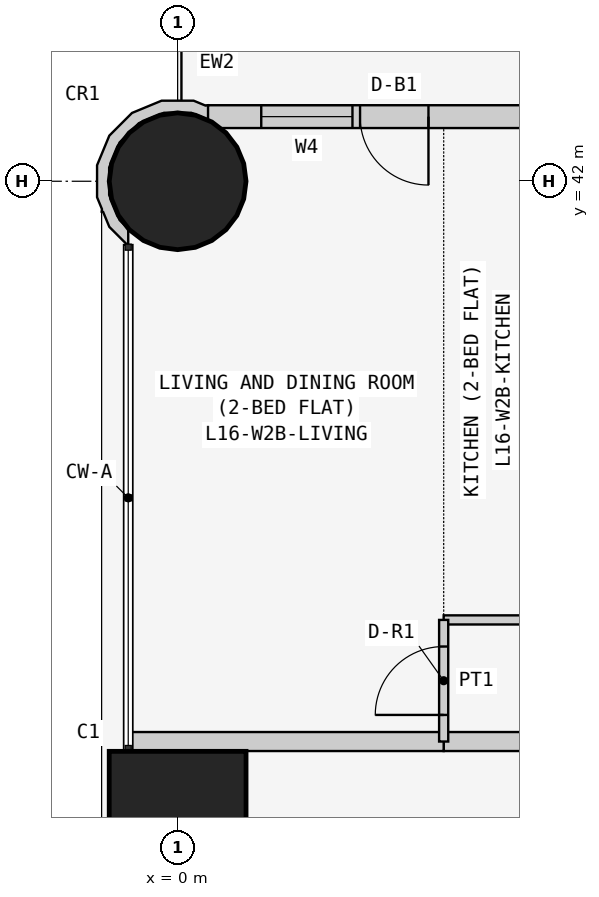
"""IFC4 building model, lengths in metres.
Left out: names, types, materials, properties, quantities, classifications, styles, units other than length and angle.
Written with IfcOpenShell. Run it as: python <this file> out.ifc"""

import sys

from ifc_helpers import new_model, si_unit, direction, frame, frame_2d, origin, origin_2d, place, context, subcontext, project, spatial, polyline, rectangle, circle, outline, extrude, element, fill, save


model = new_model("IFC4")
c1 = context("Model", 3, precision=1e-05, world=origin(), true_north=direction((0.0, 1.0)))
c2 = subcontext(c1, "Body", "Model", "MODEL_VIEW")
j1 = project(units=[si_unit("LENGTHUNIT", "METRE"), si_unit("PLANEANGLEUNIT", "RADIAN")], contexts=[c1])
p1 = place(None, origin())
s1 = spatial("IfcSite", under=j1, at=p1, CompositionType="ELEMENT")
p2 = place(p1, origin())
s2 = spatial("IfcBuilding", under=s1, at=p2, CompositionType="ELEMENT")
p3 = place(p2, frame((0.0, 0.0, 66.9)))
s3 = spatial("IfcBuildingStorey", under=s2, at=p3, CompositionType="ELEMENT", Elevation=66.9)
p4 = place(p3, frame((0.0, 33.6, 0.0), z_axis=(0.0, 0.0, 1.0), x_axis=(1.0, 0.0, 0.0)))
e1 = element("IfcColumn", 1, at=p4, inside=s3, PredefinedType="COLUMN", context=c2, shape_type="SweptSolid", body=[
    extrude(rectangle(XDim=1.8, YDim=1.8, at=origin_2d()), origin(), (0.0, 0.0, 1.0), 3.6),
])
p5 = place(p3, frame((0.0, 42.0, 0.0), z_axis=(0.0, 0.0, 1.0), x_axis=(1.0, 0.0, 0.0)))
e2 = element("IfcColumn", 2, at=p5, inside=s3, PredefinedType="COLUMN", context=c2, shape_type="SweptSolid", body=[
    extrude(circle(Radius=0.9, at=origin_2d()), origin(), (0.0, 0.0, 1.0), 3.6),
])
p6 = place(p3, frame((15.8, 42.85, 0.0), z_axis=(0.0, 0.0, 1.0), x_axis=(-1.0, 0.0, 0.0)))
e3 = element("IfcWall", 3, at=p6, inside=s3, PredefinedType="SOLIDWALL", context=c2, shape_type="SweptSolid", body=[
    extrude(rectangle(XDim=15.4, YDim=0.3, at=frame_2d((7.7, 0.0))), origin(), (0.0, 0.0, 1.0), 3.45),
])
p7 = place(p6, frame((1.2, 0.0, 0.9)))
e4 = element("IfcOpeningElement", 4, at=p7, cuts=e3, PredefinedType="OPENING", context=c2, shape_type="SweptSolid", body=[
    extrude(rectangle(XDim=1.8, YDim=1.5, at=frame_2d((0.9, 0.75))), frame((0.0, 0.16, 0.0), z_axis=(0.0, -1.0, 0.0), x_axis=(1.0, 0.0, 0.0)), (0.0, 0.0, 1.0), 0.32),
])
p8 = place(p6, frame((4.95, 0.0, 1.5)))
e5 = element("IfcOpeningElement", 5, at=p8, cuts=e3, PredefinedType="OPENING", context=c2, shape_type="SweptSolid", body=[
    extrude(rectangle(XDim=0.9, YDim=0.7, at=frame_2d((0.45, 0.35))), frame((0.0, 0.16, 0.0), z_axis=(0.0, -1.0, 0.0), x_axis=(1.0, 0.0, 0.0)), (0.0, 0.0, 1.0), 0.32),
])
p9 = place(p6, frame((8.5, 0.0, 0.9)))
e6 = element("IfcOpeningElement", 6, at=p9, cuts=e3, PredefinedType="OPENING", context=c2, shape_type="SweptSolid", body=[
    extrude(rectangle(XDim=1.8, YDim=1.5, at=frame_2d((0.9, 0.75))), frame((0.0, 0.16, 0.0), z_axis=(0.0, -1.0, 0.0), x_axis=(1.0, 0.0, 0.0)), (0.0, 0.0, 1.0), 0.32),
])
p10 = place(p6, frame((12.5, 0.0, 0.0)))
e7 = element("IfcOpeningElement", 7, at=p10, cuts=e3, PredefinedType="OPENING", context=c2, shape_type="SweptSolid", body=[
    extrude(rectangle(XDim=0.9, YDim=2.4, at=frame_2d((0.45, 1.2))), frame((0.0, 0.16, 0.0), z_axis=(0.0, -1.0, 0.0), x_axis=(1.0, 0.0, 0.0)), (0.0, 0.0, 1.0), 0.32),
])
p11 = place(p6, frame((13.5, 0.0, 0.9)))
e8 = element("IfcOpeningElement", 8, at=p11, cuts=e3, PredefinedType="OPENING", context=c2, shape_type="SweptSolid", body=[
    extrude(rectangle(XDim=1.2, YDim=1.5, at=frame_2d((0.6, 0.75))), frame((0.0, 0.16, 0.0), z_axis=(0.0, -1.0, 0.0), x_axis=(1.0, 0.0, 0.0)), (0.0, 0.0, 1.0), 0.32),
])
p12 = place(p3, frame((0.364, 42.91, 0.0), z_axis=(0.0, 0.0, 1.0), x_axis=(-0.926129809145, 0.377204953059, 0.0)))
e9 = element("IfcWall", 9, at=p12, inside=s3, PredefinedType="SOLIDWALL", context=c2, shape_type="SweptSolid", body=[
    extrude(outline(polyline([(0.36, 1.803), (0.509, 1.741), (0.761, 1.486), (0.896, 1.154), (0.894, 0.795), (0.755, 0.465), (0.5, 0.213), (0.168, 0.078), (-0.1, 0.08), (0.001, -0.097), (0.03, -0.08), (0.199, -0.081), (0.589, 0.078), (0.889, 0.374), (1.053, 0.763), (1.055, 1.185), (0.896, 1.575), (0.778, 1.695), (0.769, 1.728), (0.75, 1.723), (0.6, 1.875), (0.295, 2.003), (0.281, 1.998), (0.36, 1.803)])), origin(), (0.0, 0.0, 1.0), 3.45),
])
p13 = place(p3, frame((3.5, 34.629, 0.0), z_axis=(0.0, 0.0, 1.0), x_axis=(1.0, 0.0, 0.0)))
e10 = element("IfcWall", 10, at=p13, inside=s3, PredefinedType="PARTITIONING", context=c2, shape_type="SweptSolid", body=[
    extrude(rectangle(XDim=6.3, YDim=0.25, at=frame_2d((3.15, 0.0))), origin(), (0.0, 0.0, 1.0), 3.45),
])
p14 = place(p3, frame((-0.65, 34.629, 0.0), z_axis=(0.0, 0.0, 1.0), x_axis=(1.0, 0.0, 0.0)))
e11 = element("IfcWall", 11, at=p14, inside=s3, PredefinedType="PARTITIONING", context=c2, shape_type="SweptSolid", body=[
    extrude(rectangle(XDim=4.15, YDim=0.25, at=frame_2d((2.075, 0.0))), origin(), (0.0, 0.0, 1.0), 3.45),
])
p15 = place(p3, frame((3.5, 36.229, 0.0), z_axis=(0.0, 0.0, 1.0), x_axis=(1.0, 0.0, 0.0)))
e12 = element("IfcWall", 12, at=p15, inside=s3, PredefinedType="PARTITIONING", context=c2, shape_type="SweptSolid", body=[
    extrude(rectangle(XDim=1.2, YDim=0.12, at=frame_2d((0.6, 0.0))), origin(), (0.0, 0.0, 1.0), 3.45),
])
p16 = place(p3, frame((3.5, 34.629, 0.0), z_axis=(0.0, 0.0, 1.0), x_axis=(0.0, 1.0, 0.0)))
e13 = element("IfcWall", 13, at=p16, inside=s3, PredefinedType="PARTITIONING", context=c2, shape_type="SweptSolid", body=[
    extrude(rectangle(XDim=1.6, YDim=0.12, at=frame_2d((0.8, 0.0))), origin(), (0.0, 0.0, 1.0), 3.45),
])
p17 = place(p16, frame((0.35, 0.0, 0.0)))
e14 = element("IfcOpeningElement", 14, at=p17, cuts=e13, PredefinedType="OPENING", context=c2, shape_type="SweptSolid", body=[
    extrude(rectangle(XDim=0.9, YDim=2.1, at=frame_2d((0.45, 1.05))), frame((0.0, 0.07, 0.0), z_axis=(0.0, -1.0, 0.0), x_axis=(1.0, 0.0, 0.0)), (0.0, 0.0, 1.0), 0.14),
])
p18 = place(p10, origin())
e15 = element("IfcDoor", 15, at=p18, inside=s3, OperationType="SINGLE_SWING_LEFT", PredefinedType="DOOR", context=c2, shape_type="SweptSolid", body=[
    extrude(rectangle(XDim=0.9, YDim=2.4, at=frame_2d((0.45, 1.2))), frame((0.0, 0.025, 0.0), z_axis=(0.0, -1.0, 0.0), x_axis=(1.0, 0.0, 0.0)), (0.0, 0.0, 1.0), 0.05),
])
fill(e7, e15)
p19 = place(p11, origin())
e16 = element("IfcWindow", 16, at=p19, inside=s3, PartitioningType="SINGLE_PANEL", PredefinedType="WINDOW", context=c2, shape_type="SweptSolid", body=[
    extrude(rectangle(XDim=1.2, YDim=1.5, at=frame_2d((0.6, 0.75))), frame((0.0, 0.03, 0.0), z_axis=(0.0, -1.0, 0.0), x_axis=(1.0, 0.0, 0.0)), (0.0, 0.0, 1.0), 0.06),
])
fill(e8, e16)
p20 = place(p17, origin())
e17 = element("IfcDoor", 17, at=p20, inside=s3, OperationType="SINGLE_SWING_LEFT", PredefinedType="DOOR", context=c2, shape_type="SweptSolid", body=[
    extrude(rectangle(XDim=0.9, YDim=2.1, at=frame_2d((0.45, 1.05))), frame((0.0, 0.025, 0.0), z_axis=(0.0, -1.0, 0.0), x_axis=(1.0, 0.0, 0.0)), (0.0, 0.0, 1.0), 0.05),
])
fill(e14, e17)
save(model, sys.argv[1])
